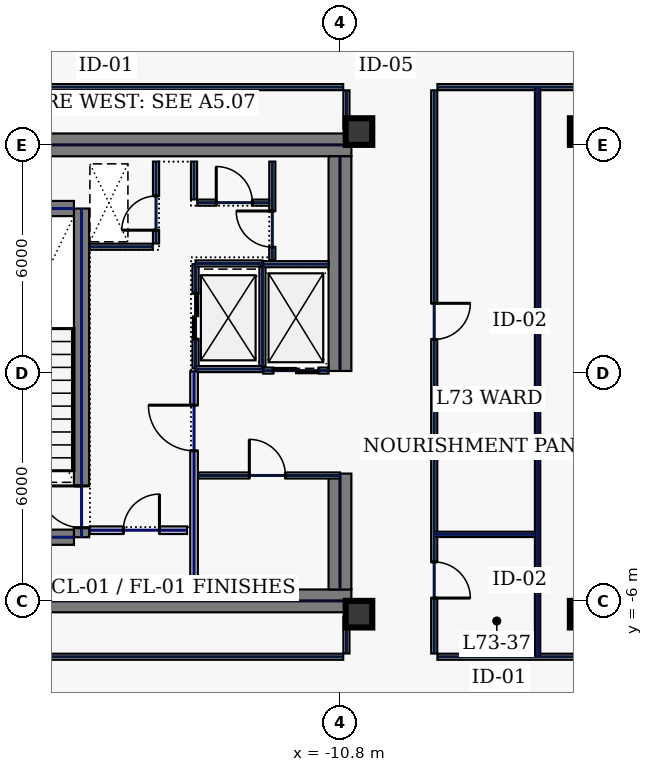
"""IFC4 building model, lengths in metres.
Left out: names, types, materials, properties, quantities, classifications, styles, units other than length and angle.
Written with IfcOpenShell. Run it as: python <this file> out.ifc"""

import sys

from ifc_helpers import new_model, si_unit, direction, frame, frame_2d, origin, origin_2d, place, context, subcontext, project, spatial, rectangle, hollow_rectangle, extrude, element, fill, save


model = new_model("IFC4")
c1 = context("Model", 3, precision=1e-05, world=origin(), true_north=direction((0.0, 1.0)))
c2 = subcontext(c1, "Body", "Model", "MODEL_VIEW")
j1 = project(units=[si_unit("LENGTHUNIT", "METRE"), si_unit("PLANEANGLEUNIT", "RADIAN")], contexts=[c1])
p1 = place(None, origin())
s1 = spatial("IfcSite", under=j1, at=p1, CompositionType="ELEMENT")
p2 = place(p1, origin())
s2 = spatial("IfcBuilding", under=s1, at=p2, CompositionType="ELEMENT")
p3 = place(p2, frame((0.0, 0.0, 313.0)))
s3 = spatial("IfcBuildingStorey", under=s2, at=p3, CompositionType="ELEMENT", Elevation=313.0)
for number, where, z_axis, x_axis in (
    (1, (-22.0, 6.0, 0.0), (0.0, 0.0, 1.0), (1.0, 0.0, 0.0)),
    (2, (-22.0, -6.0, 0.0), (0.0, 0.0, 1.0), (1.0, 0.0, 0.0)),
):
    element("IfcWall", number, at=place(p3, frame(where, z_axis=z_axis, x_axis=x_axis)), inside=s3, PredefinedType="SHEAR", context=c2, shape_type="SweptSolid", body=[
        extrude(rectangle(XDim=11.5, YDim=0.6, at=frame_2d((5.75, 0.0))), origin(), (0.0, 0.0, 1.0), 3.74),
    ])
p4 = place(p3, frame((-10.8, -5.7, 0.0), z_axis=(0.0, 0.0, 1.0), x_axis=(0.0, 1.0, 0.0)))
e3 = element("IfcWall", 3, at=p4, inside=s3, PredefinedType="SHEAR", context=c2, shape_type="SweptSolid", body=[
    extrude(rectangle(XDim=3.05, YDim=0.6, at=frame_2d((1.525, 0.0))), origin(), (0.0, 0.0, 1.0), 3.74),
])
p5 = place(p3, frame((-10.8, 0.05, 0.0), z_axis=(0.0, 0.0, 1.0), x_axis=(0.0, 1.0, 0.0)))
e4 = element("IfcWall", 4, at=p5, inside=s3, PredefinedType="SHEAR", context=c2, shape_type="SweptSolid", body=[
    extrude(rectangle(XDim=5.65, YDim=0.6, at=frame_2d((2.825, 0.0))), origin(), (0.0, 0.0, 1.0), 3.74),
])
p6 = place(p3, frame((-17.6, -4.325, 0.0), z_axis=(0.0, 0.0, 1.0), x_axis=(0.0, 1.0, 0.0)))
e5 = element("IfcWall", 5, at=p6, inside=s3, PredefinedType="SHEAR", context=c2, shape_type="SweptSolid", body=[
    extrude(rectangle(XDim=8.65, YDim=0.4, at=frame_2d((4.325, 0.0))), origin(), (0.0, 0.0, 1.0), 3.74),
])
p7 = place(p6, frame((0.25, 0.0, 0.0)))
e6 = element("IfcOpeningElement", 6, at=p7, cuts=e5, PredefinedType="OPENING", context=c2, shape_type="SweptSolid", body=[
    extrude(rectangle(XDim=1.1, YDim=2.2, at=frame_2d((0.55, 1.1))), frame((0.0, 0.21, 0.0), z_axis=(0.0, -1.0, 0.0), x_axis=(1.0, 0.0, 0.0)), (0.0, 0.0, 1.0), 0.42),
])
for number, where, z_axis, x_axis in (
    (7, (-21.2, -4.325, 0.0), (0.0, 0.0, 1.0), (1.0, 0.0, 0.0)),
    (8, (-21.2, 4.325, 0.0), (0.0, 0.0, 1.0), (1.0, 0.0, 0.0)),
):
    element("IfcWall", number, at=place(p3, frame(where, z_axis=z_axis, x_axis=x_axis)), inside=s3, PredefinedType="SHEAR", context=c2, shape_type="SweptSolid", body=[
        extrude(rectangle(XDim=3.4, YDim=0.4, at=frame_2d((1.7, 0.0))), origin(), (0.0, 0.0, 1.0), 3.74),
    ])
for number, where, z_axis, x_axis in (
    (9, (-10.3, -6.35, 0.0), (0.0, 0.0, 1.0), (1.0, 0.0, 0.0)),
    (10, (-10.3, 6.35, 0.0), (0.0, 0.0, 1.0), (1.0, 0.0, 0.0)),
    (11, (-4.4, -6.35, 0.0), (0.0, 0.0, 1.0), (1.0, 0.0, 0.0)),
    (12, (-4.4, 6.35, 0.0), (0.0, 0.0, 1.0), (1.0, 0.0, 0.0)),
):
    element("IfcColumn", number, at=place(p3, frame(where, z_axis=z_axis, x_axis=x_axis)), inside=s3, PredefinedType="COLUMN", context=c2, shape_type="SweptSolid", body=[
        extrude(hollow_rectangle(XDim=0.7, YDim=0.7, WallThickness=0.032, at=origin_2d()), origin(), (0.0, 0.0, 1.0), 3.74),
    ])
p8 = place(p3, frame((-14.6, 0.12, 0.0), z_axis=(0.0, 0.0, 1.0), x_axis=(0.0, 1.0, 0.0)))
e13 = element("IfcWall", 13, at=p8, inside=s3, PredefinedType="PARTITIONING", context=c2, shape_type="SweptSolid", body=[
    extrude(rectangle(XDim=2.74, YDim=0.16, at=frame_2d((1.37, 0.0))), origin(), (0.0, 0.0, 1.0), 3.74),
])
p9 = place(p8, frame((0.77, 0.0, 0.0)))
e14 = element("IfcOpeningElement", 14, at=p9, cuts=e13, PredefinedType="OPENING", context=c2, shape_type="SweptSolid", body=[
    extrude(rectangle(XDim=1.2, YDim=2.2, at=frame_2d((0.6, 1.1))), frame((0.0, 0.09, 0.0), z_axis=(0.0, -1.0, 0.0), x_axis=(1.0, 0.0, 0.0)), (0.0, 0.0, 1.0), 0.18),
])
for number, where, z_axis, x_axis in (
    (15, (-14.6, 0.1, 0.0), (0.0, 0.0, 1.0), (1.0, 0.0, 0.0)),
    (16, (-14.6, 2.88, 0.0), (0.0, 0.0, 1.0), (1.0, 0.0, 0.0)),
):
    element("IfcWall", number, at=place(p3, frame(where, z_axis=z_axis, x_axis=x_axis)), inside=s3, PredefinedType="PARTITIONING", context=c2, shape_type="SweptSolid", body=[
        extrude(rectangle(XDim=1.76, YDim=0.16, at=frame_2d((0.88, 0.0))), origin(), (0.0, 0.0, 1.0), 3.74),
    ])
p10 = place(p3, frame((-12.84, 0.18, 0.0), z_axis=(0.0, 0.0, 1.0), x_axis=(0.0, 1.0, 0.0)))
e17 = element("IfcWall", 17, at=p10, inside=s3, PredefinedType="PARTITIONING", context=c2, shape_type="SweptSolid", body=[
    extrude(rectangle(XDim=2.62, YDim=0.16, at=frame_2d((1.31, 0.0))), origin(), (0.0, 0.0, 1.0), 3.74),
])
p11 = place(p3, frame((-12.82, 0.06, 0.0), z_axis=(0.0, 0.0, 1.0), x_axis=(1.0, 0.0, 0.0)))
e18 = element("IfcWall", 18, at=p11, inside=s3, PredefinedType="PARTITIONING", context=c2, shape_type="SweptSolid", body=[
    extrude(rectangle(XDim=1.72, YDim=0.16, at=frame_2d((0.86, 0.0))), origin(), (0.0, 0.0, 1.0), 3.74),
])
p12 = place(p11, frame((0.26, 0.0, 0.0)))
e19 = element("IfcOpeningElement", 19, at=p12, cuts=e18, PredefinedType="OPENING", context=c2, shape_type="SweptSolid", body=[
    extrude(rectangle(XDim=1.2, YDim=2.2, at=frame_2d((0.6, 1.1))), frame((0.0, 0.09, 0.0), z_axis=(0.0, -1.0, 0.0), x_axis=(1.0, 0.0, 0.0)), (0.0, 0.0, 1.0), 0.18),
])
p13 = place(p3, frame((-12.82, 2.86, 0.0), z_axis=(0.0, 0.0, 1.0), x_axis=(1.0, 0.0, 0.0)))
e20 = element("IfcWall", 20, at=p13, inside=s3, PredefinedType="PARTITIONING", context=c2, shape_type="SweptSolid", body=[
    extrude(rectangle(XDim=1.72, YDim=0.16, at=frame_2d((0.86, 0.0))), origin(), (0.0, 0.0, 1.0), 3.74),
])
p14 = place(p3, frame((-15.64, 3.405, 0.0), z_axis=(0.0, 0.0, 1.0), x_axis=(0.0, 1.0, 0.0)))
e21 = element("IfcWall", 21, at=p14, inside=s3, PredefinedType="PARTITIONING", context=c2, shape_type="SweptSolid", body=[
    extrude(rectangle(XDim=2.155, YDim=0.16, at=frame_2d((1.078, 0.0))), origin(), (0.0, 0.0, 1.0), 3.74),
])
p15 = place(p14, frame((0.35, 0.0, 0.0)))
e22 = element("IfcOpeningElement", 22, at=p15, cuts=e21, PredefinedType="OPENING", context=c2, shape_type="SweptSolid", body=[
    extrude(rectangle(XDim=0.9, YDim=2.2, at=frame_2d((0.45, 1.1))), frame((0.0, 0.09, 0.0), z_axis=(0.0, -1.0, 0.0), x_axis=(1.0, 0.0, 0.0)), (0.0, 0.0, 1.0), 0.18),
])
p16 = place(p3, frame((-17.38, 3.32, 0.0), z_axis=(0.0, 0.0, 1.0), x_axis=(1.0, 0.0, 0.0)))
e23 = element("IfcWall", 23, at=p16, inside=s3, PredefinedType="PARTITIONING", context=c2, shape_type="SweptSolid", body=[
    extrude(rectangle(XDim=1.655, YDim=0.16, at=frame_2d((0.827, 0.0))), origin(), (0.0, 0.0, 1.0), 3.74),
])
p17 = place(p3, frame((-17.38, -4.14, 0.0), z_axis=(0.0, 0.0, 1.0), x_axis=(1.0, 0.0, 0.0)))
e24 = element("IfcWall", 24, at=p17, inside=s3, PredefinedType="SOLIDWALL", context=c2, shape_type="SweptSolid", body=[
    extrude(rectangle(XDim=2.555, YDim=0.2, at=frame_2d((1.277, 0.0))), origin(), (0.0, 0.0, 1.0), 3.74),
])
p18 = place(p17, frame((0.88, 0.0, 0.0)))
e25 = element("IfcOpeningElement", 25, at=p18, cuts=e24, PredefinedType="OPENING", context=c2, shape_type="SweptSolid", body=[
    extrude(rectangle(XDim=0.95, YDim=2.2, at=frame_2d((0.475, 1.1))), frame((0.0, 0.11, 0.0), z_axis=(0.0, -1.0, 0.0), x_axis=(1.0, 0.0, 0.0)), (0.0, 0.0, 1.0), 0.22),
])
p19 = place(p3, frame((-14.535, -2.7, 0.0), z_axis=(0.0, 0.0, 1.0), x_axis=(1.0, 0.0, 0.0)))
e26 = element("IfcWall", 26, at=p19, inside=s3, PredefinedType="PARTITIONING", context=c2, shape_type="SweptSolid", body=[
    extrude(rectangle(XDim=3.735, YDim=0.16, at=frame_2d((1.867, 0.0))), origin(), (0.0, 0.0, 1.0), 3.74),
])
p20 = place(p19, frame((1.35, 0.0, 0.0)))
e27 = element("IfcOpeningElement", 27, at=p20, cuts=e26, PredefinedType="OPENING", context=c2, shape_type="SweptSolid", body=[
    extrude(rectangle(XDim=0.95, YDim=2.2, at=frame_2d((0.475, 1.1))), frame((0.0, 0.09, 0.0), z_axis=(0.0, -1.0, 0.0), x_axis=(1.0, 0.0, 0.0)), (0.0, 0.0, 1.0), 0.18),
])
p21 = place(p3, frame((-12.58, 2.96, 0.0), z_axis=(0.0, 0.0, 1.0), x_axis=(0.0, 1.0, 0.0)))
e28 = element("IfcWall", 28, at=p21, inside=s3, PredefinedType="PARTITIONING", context=c2, shape_type="SweptSolid", body=[
    extrude(rectangle(XDim=2.6, YDim=0.16, at=frame_2d((1.3, 0.0))), origin(), (0.0, 0.0, 1.0), 3.74),
])
p22 = place(p21, frame((0.35, 0.0, 0.0)))
e29 = element("IfcOpeningElement", 29, at=p22, cuts=e28, PredefinedType="OPENING", context=c2, shape_type="SweptSolid", body=[
    extrude(rectangle(XDim=0.95, YDim=2.2, at=frame_2d((0.475, 1.1))), frame((0.0, 0.09, 0.0), z_axis=(0.0, -1.0, 0.0), x_axis=(1.0, 0.0, 0.0)), (0.0, 0.0, 1.0), 0.18),
])
p23 = place(p3, frame((-14.555, 4.48, 0.0), z_axis=(0.0, 0.0, 1.0), x_axis=(1.0, 0.0, 0.0)))
e30 = element("IfcWall", 30, at=p23, inside=s3, PredefinedType="PARTITIONING", context=c2, shape_type="SweptSolid", body=[
    extrude(rectangle(XDim=1.89, YDim=0.16, at=frame_2d((0.945, 0.0))), origin(), (0.0, 0.0, 1.0), 3.74),
])
p24 = place(p23, frame((0.5, 0.0, 0.0)))
e31 = element("IfcOpeningElement", 31, at=p24, cuts=e30, PredefinedType="OPENING", context=c2, shape_type="SweptSolid", body=[
    extrude(rectangle(XDim=0.95, YDim=2.2, at=frame_2d((0.475, 1.1))), frame((0.0, 0.09, 0.0), z_axis=(0.0, -1.0, 0.0), x_axis=(1.0, 0.0, 0.0)), (0.0, 0.0, 1.0), 0.18),
])
p25 = place(p3, frame((-14.64, 4.565, 0.0), z_axis=(0.0, 0.0, 1.0), x_axis=(0.0, 1.0, 0.0)))
e32 = element("IfcWall", 32, at=p25, inside=s3, PredefinedType="PARTITIONING", context=c2, shape_type="SweptSolid", body=[
    extrude(rectangle(XDim=0.995, YDim=0.16, at=frame_2d((0.498, 0.0))), origin(), (0.0, 0.0, 1.0), 3.74),
])
p26 = place(p3, frame((-14.64, -5.56, 0.0), z_axis=(0.0, 0.0, 1.0), x_axis=(0.0, 1.0, 0.0)))
e33 = element("IfcWall", 33, at=p26, inside=s3, PredefinedType="SOLIDWALL", context=c2, shape_type="SweptSolid", body=[
    extrude(rectangle(XDim=5.6, YDim=0.2, at=frame_2d((2.8, 0.0))), origin(), (0.0, 0.0, 1.0), 3.74),
])
p27 = place(p26, frame((3.51, 0.0, 0.0)))
e34 = element("IfcOpeningElement", 34, at=p27, cuts=e33, PredefinedType="OPENING", context=c2, shape_type="SweptSolid", body=[
    extrude(rectangle(XDim=1.2, YDim=2.2, at=frame_2d((0.6, 1.1))), frame((0.0, 0.11, 0.0), z_axis=(0.0, -1.0, 0.0), x_axis=(1.0, 0.0, 0.0)), (0.0, 0.0, 1.0), 0.22),
])
p28 = place(p3, frame((-3.965, 7.52, 0.0), z_axis=(0.0, 0.0, 1.0), x_axis=(-1.0, 0.0, 0.0)))
e35 = element("IfcWall", 35, at=p28, inside=s3, PredefinedType="PARTITIONING", context=c2, shape_type="SweptSolid", body=[
    extrude(rectangle(XDim=4.27, YDim=0.16, at=frame_2d((2.135, 0.0))), origin(), (0.0, 0.0, 1.0), 3.74),
])
p29 = place(p3, frame((-8.32, 7.435, 0.0), z_axis=(0.0, 0.0, 1.0), x_axis=(0.0, -1.0, 0.0)))
e36 = element("IfcWall", 36, at=p29, inside=s3, PredefinedType="PARTITIONING", context=c2, shape_type="SweptSolid", body=[
    extrude(rectangle(XDim=14.82, YDim=0.16, at=frame_2d((7.41, 0.0))), origin(), (0.0, 0.0, 1.0), 3.74),
])
p30 = place(p29, frame((12.411, 0.0, 0.0)))
e37 = element("IfcOpeningElement", 37, at=p30, cuts=e36, PredefinedType="OPENING", context=c2, shape_type="SweptSolid", body=[
    extrude(rectangle(XDim=0.95, YDim=2.2, at=frame_2d((0.475, 1.1))), frame((0.0, 0.09, 0.0), z_axis=(0.0, -1.0, 0.0), x_axis=(1.0, 0.0, 0.0)), (0.0, 0.0, 1.0), 0.18),
])
p31 = place(p29, frame((5.604, 0.0, 0.0)))
e38 = element("IfcOpeningElement", 38, at=p31, cuts=e36, PredefinedType="OPENING", context=c2, shape_type="SweptSolid", body=[
    extrude(rectangle(XDim=0.95, YDim=2.2, at=frame_2d((0.475, 1.1))), frame((0.0, 0.09, 0.0), z_axis=(0.0, -1.0, 0.0), x_axis=(1.0, 0.0, 0.0)), (0.0, 0.0, 1.0), 0.18),
])
p32 = place(p3, frame((-8.235, -7.47, 0.0), z_axis=(0.0, 0.0, 1.0), x_axis=(1.0, 0.0, 0.0)))
e39 = element("IfcWall", 39, at=p32, inside=s3, PredefinedType="PARTITIONING", context=c2, shape_type="SweptSolid", body=[
    extrude(rectangle(XDim=4.27, YDim=0.16, at=frame_2d((2.135, 0.0))), origin(), (0.0, 0.0, 1.0), 3.74),
])
p33 = place(p3, frame((-10.63, -7.385, 0.0), z_axis=(0.0, 0.0, 1.0), x_axis=(0.0, 1.0, 0.0)))
e40 = element("IfcWall", 40, at=p33, inside=s3, PredefinedType="PARTITIONING", context=c2, shape_type="SweptSolid", body=[
    extrude(rectangle(XDim=0.965, YDim=0.16, at=frame_2d((0.482, 0.0))), origin(), (0.0, 0.0, 1.0), 3.74),
])
p34 = place(p3, frame((-10.63, 6.42, 0.0), z_axis=(0.0, 0.0, 1.0), x_axis=(0.0, 1.0, 0.0)))
e41 = element("IfcWall", 41, at=p34, inside=s3, PredefinedType="PARTITIONING", context=c2, shape_type="SweptSolid", body=[
    extrude(rectangle(XDim=1.015, YDim=0.16, at=frame_2d((0.508, 0.0))), origin(), (0.0, 0.0, 1.0), 3.74),
])
for number, where, z_axis, x_axis in (
    (42, (-10.715, 7.52, 0.0), (0.0, 0.0, 1.0), (-1.0, 0.0, 0.0)),
    (43, (-21.915, -7.47, 0.0), (0.0, 0.0, 1.0), (1.0, 0.0, 0.0)),
):
    element("IfcWall", number, at=place(p3, frame(where, z_axis=z_axis, x_axis=x_axis)), inside=s3, PredefinedType="PARTITIONING", context=c2, shape_type="SweptSolid", body=[
        extrude(rectangle(XDim=11.2, YDim=0.16, at=frame_2d((5.6, 0.0))), origin(), (0.0, 0.0, 1.0), 3.74),
    ])
p35 = place(p3, frame((-5.6, -7.465, 0.0), z_axis=(0.0, 0.0, 1.0), x_axis=(0.0, 1.0, 0.0)))
e44 = element("IfcWall", 44, at=p35, inside=s3, PredefinedType="PARTITIONING", context=c2, shape_type="SweptSolid", body=[
    extrude(rectangle(XDim=14.98, YDim=0.14, at=frame_2d((7.49, 0.0))), origin(), (0.0, 0.0, 1.0), 3.74),
])
p36 = place(p3, frame((-8.315, -4.25, 0.0), z_axis=(0.0, 0.0, 1.0), x_axis=(1.0, 0.0, 0.0)))
e45 = element("IfcWall", 45, at=p36, inside=s3, PredefinedType="PARTITIONING", context=c2, shape_type="SweptSolid", body=[
    extrude(rectangle(XDim=2.64, YDim=0.14, at=frame_2d((1.32, 0.0))), origin(), (0.0, 0.0, 1.0), 3.74),
])
p37 = place(p7, origin())
e46 = element("IfcDoor", 46, at=p37, inside=s3, OperationType="SINGLE_SWING_RIGHT", PredefinedType="DOOR", context=c2, shape_type="SweptSolid", body=[
    extrude(rectangle(XDim=1.1, YDim=2.2, at=frame_2d((0.55, 1.1))), frame((0.0, 0.025, 0.0), z_axis=(0.0, -1.0, 0.0), x_axis=(1.0, 0.0, 0.0)), (0.0, 0.0, 1.0), 0.05),
])
fill(e6, e46)
p38 = place(p9, origin())
e47 = element("IfcDoor", 47, at=p38, inside=s3, OperationType="SLIDING_TO_LEFT", PredefinedType="DOOR", context=c2, shape_type="SweptSolid", body=[
    extrude(rectangle(XDim=1.2, YDim=2.2, at=frame_2d((0.6, 1.1))), frame((0.0, 0.025, 0.0), z_axis=(0.0, -1.0, 0.0), x_axis=(1.0, 0.0, 0.0)), (0.0, 0.0, 1.0), 0.05),
])
fill(e14, e47)
p39 = place(p12, origin())
e48 = element("IfcDoor", 48, at=p39, inside=s3, OperationType="SLIDING_TO_LEFT", PredefinedType="DOOR", context=c2, shape_type="SweptSolid", body=[
    extrude(rectangle(XDim=1.2, YDim=2.2, at=frame_2d((0.6, 1.1))), frame((0.0, 0.025, 0.0), z_axis=(0.0, -1.0, 0.0), x_axis=(1.0, 0.0, 0.0)), (0.0, 0.0, 1.0), 0.05),
])
fill(e19, e48)
p40 = place(p15, origin())
e49 = element("IfcDoor", 49, at=p40, inside=s3, OperationType="SINGLE_SWING_LEFT", PredefinedType="DOOR", context=c2, shape_type="SweptSolid", body=[
    extrude(rectangle(XDim=0.9, YDim=2.2, at=frame_2d((0.45, 1.1))), frame((0.0, 0.025, 0.0), z_axis=(0.0, -1.0, 0.0), x_axis=(1.0, 0.0, 0.0)), (0.0, 0.0, 1.0), 0.05),
])
fill(e22, e49)
p41 = place(p18, origin())
e50 = element("IfcDoor", 50, at=p41, inside=s3, OperationType="SINGLE_SWING_RIGHT", PredefinedType="DOOR", context=c2, shape_type="SweptSolid", body=[
    extrude(rectangle(XDim=0.95, YDim=2.2, at=frame_2d((0.475, 1.1))), frame((0.0, 0.025, 0.0), z_axis=(0.0, -1.0, 0.0), x_axis=(1.0, 0.0, 0.0)), (0.0, 0.0, 1.0), 0.05),
])
fill(e25, e50)
p42 = place(p20, origin())
e51 = element("IfcDoor", 51, at=p42, inside=s3, OperationType="SINGLE_SWING_LEFT", PredefinedType="DOOR", context=c2, shape_type="SweptSolid", body=[
    extrude(rectangle(XDim=0.95, YDim=2.2, at=frame_2d((0.475, 1.1))), frame((0.0, 0.025, 0.0), z_axis=(0.0, -1.0, 0.0), x_axis=(1.0, 0.0, 0.0)), (0.0, 0.0, 1.0), 0.05),
])
fill(e27, e51)
p43 = place(p22, origin())
e52 = element("IfcDoor", 52, at=p43, inside=s3, OperationType="SINGLE_SWING_RIGHT", PredefinedType="DOOR", context=c2, shape_type="SweptSolid", body=[
    extrude(rectangle(XDim=0.95, YDim=2.2, at=frame_2d((0.475, 1.1))), frame((0.0, 0.025, 0.0), z_axis=(0.0, -1.0, 0.0), x_axis=(1.0, 0.0, 0.0)), (0.0, 0.0, 1.0), 0.05),
])
fill(e29, e52)
p44 = place(p24, origin())
e53 = element("IfcDoor", 53, at=p44, inside=s3, OperationType="SINGLE_SWING_LEFT", PredefinedType="DOOR", context=c2, shape_type="SweptSolid", body=[
    extrude(rectangle(XDim=0.95, YDim=2.2, at=frame_2d((0.475, 1.1))), frame((0.0, 0.025, 0.0), z_axis=(0.0, -1.0, 0.0), x_axis=(1.0, 0.0, 0.0)), (0.0, 0.0, 1.0), 0.05),
])
fill(e31, e53)
p45 = place(p27, origin())
e54 = element("IfcDoor", 54, at=p45, inside=s3, OperationType="SINGLE_SWING_RIGHT", PredefinedType="DOOR", context=c2, shape_type="SweptSolid", body=[
    extrude(rectangle(XDim=1.2, YDim=2.2, at=frame_2d((0.6, 1.1))), frame((0.0, 0.025, 0.0), z_axis=(0.0, -1.0, 0.0), x_axis=(1.0, 0.0, 0.0)), (0.0, 0.0, 1.0), 0.05),
])
fill(e34, e54)
p46 = place(p30, origin())
e55 = element("IfcDoor", 55, at=p46, inside=s3, OperationType="SINGLE_SWING_RIGHT", PredefinedType="DOOR", context=c2, shape_type="SweptSolid", body=[
    extrude(rectangle(XDim=0.95, YDim=2.2, at=frame_2d((0.475, 1.1))), frame((0.0, 0.025, 0.0), z_axis=(0.0, -1.0, 0.0), x_axis=(1.0, 0.0, 0.0)), (0.0, 0.0, 1.0), 0.05),
])
fill(e37, e55)
p47 = place(p31, origin())
e56 = element("IfcDoor", 56, at=p47, inside=s3, OperationType="SINGLE_SWING_LEFT", PredefinedType="DOOR", context=c2, shape_type="SweptSolid", body=[
    extrude(rectangle(XDim=0.95, YDim=2.2, at=frame_2d((0.475, 1.1))), frame((0.0, 0.025, 0.0), z_axis=(0.0, -1.0, 0.0), x_axis=(1.0, 0.0, 0.0)), (0.0, 0.0, 1.0), 0.05),
])
fill(e38, e56)
save(model, sys.argv[1])
